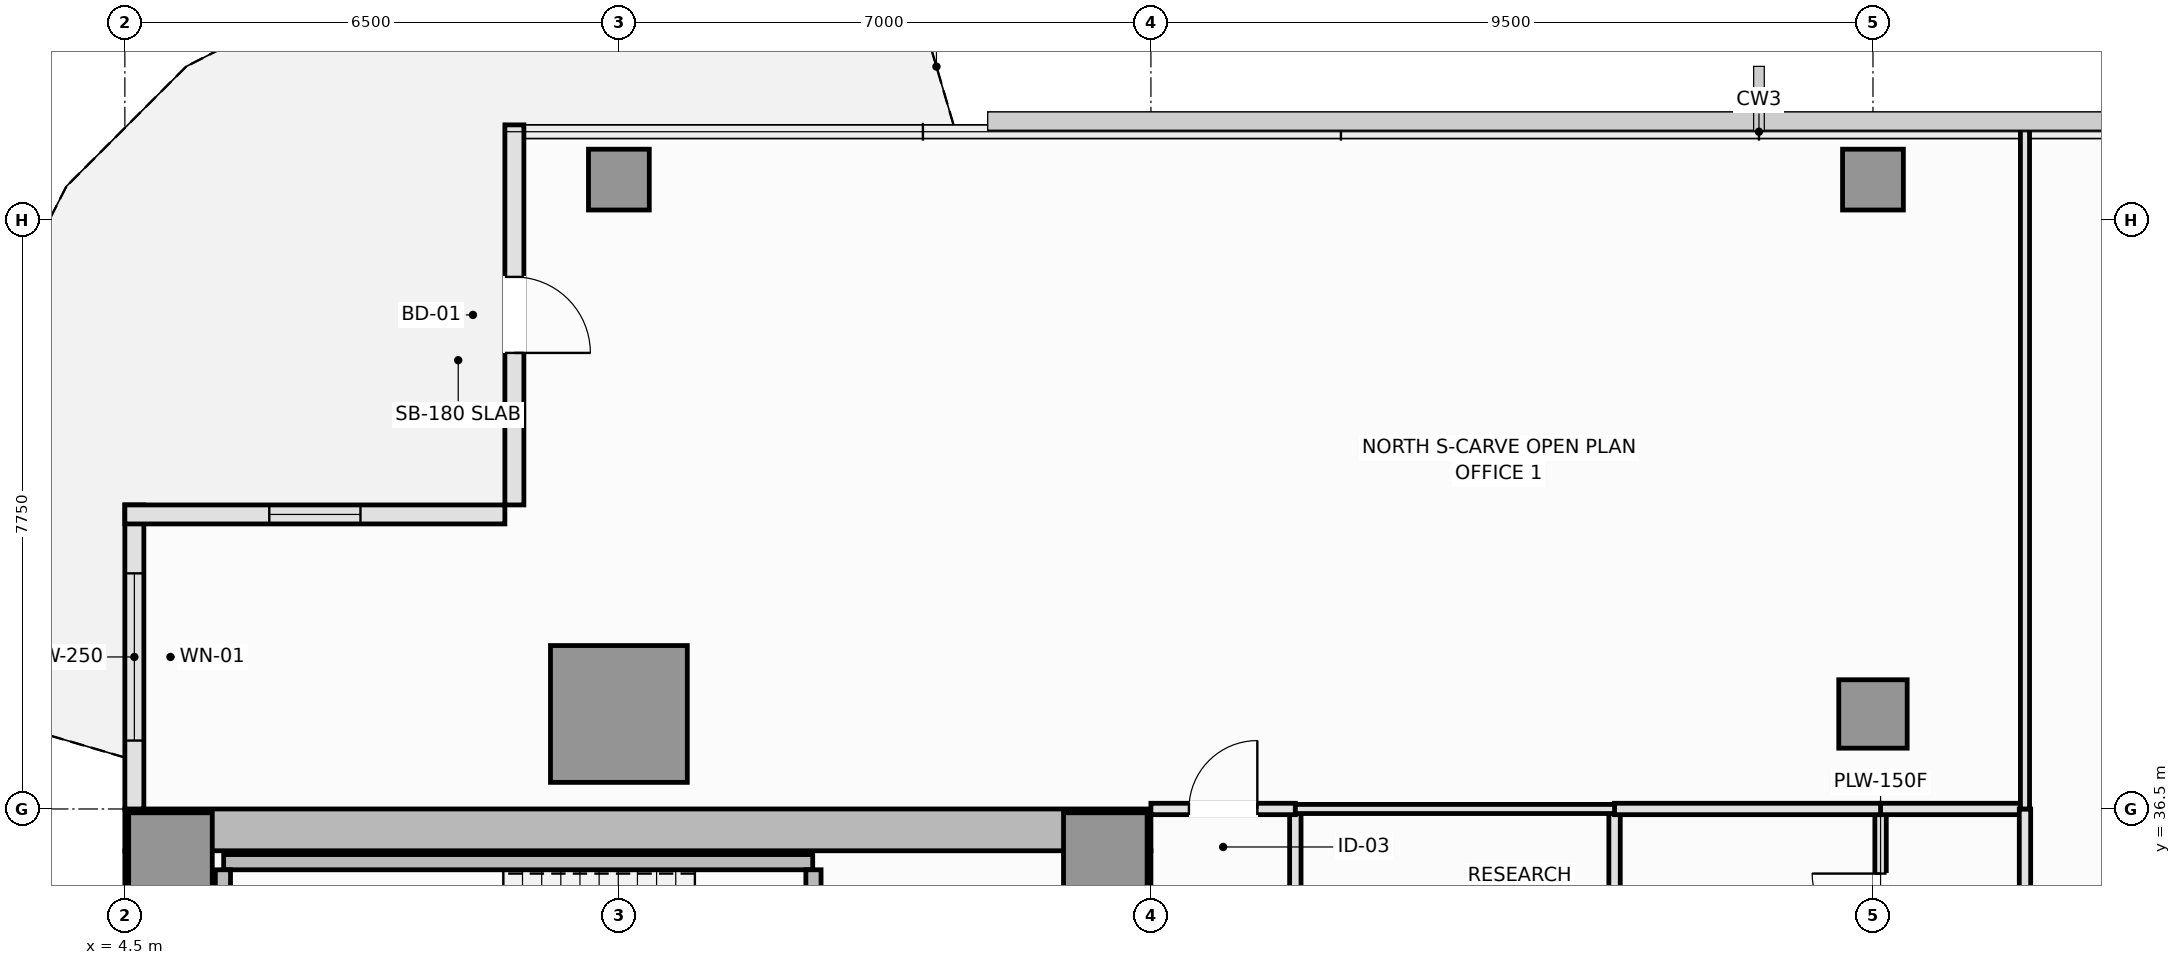
"""IFC4 building model, lengths in metres.
Left out: names, types, materials, properties, quantities, classifications, styles, units other than length and angle.
Written with IfcOpenShell. Run it as: python <this file> out.ifc"""

import sys

from ifc_helpers import new_model, si_unit, direction, frame, frame_2d, origin, origin_2d, place, context, subcontext, project, spatial, rectangle, extrude, element, fill, save


model = new_model("IFC4")
c1 = context("Model", 3, precision=1e-05, world=origin(), true_north=direction((0.0, 1.0)))
c2 = subcontext(c1, "Body", "Model", "MODEL_VIEW")
j1 = project(units=[si_unit("LENGTHUNIT", "METRE"), si_unit("PLANEANGLEUNIT", "RADIAN")], contexts=[c1])
p1 = place(None, origin())
s1 = spatial("IfcSite", under=j1, at=p1, CompositionType="ELEMENT")
p2 = place(p1, origin())
s2 = spatial("IfcBuilding", under=s1, at=p2, CompositionType="ELEMENT")
p3 = place(p2, frame((0.0, 0.0, 191.6)))
s3 = spatial("IfcBuildingStorey", under=s2, at=p3, CompositionType="ELEMENT", Elevation=191.6)
p4 = place(p3, frame((4.5, 36.225, 0.0), z_axis=(0.0, 0.0, 1.0), x_axis=(1.0, 0.0, 0.0)))
e1 = element("IfcWall", 1, at=p4, inside=s3, PredefinedType="SHEAR", context=c2, shape_type="SweptSolid", body=[
    extrude(rectangle(XDim=13.5, YDim=0.55, at=frame_2d((6.75, 0.0))), origin(), (0.0, 0.0, 1.0), 3.55),
])
p5 = place(p3, frame((4.775, 14.55, 0.0), z_axis=(0.0, 0.0, 1.0), x_axis=(0.0, 1.0, 0.0)))
e2 = element("IfcWall", 2, at=p5, inside=s3, PredefinedType="SHEAR", context=c2, shape_type="SweptSolid", body=[
    extrude(rectangle(XDim=21.4, YDim=0.55, at=frame_2d((10.7, 0.0))), origin(), (0.0, 0.0, 1.0), 3.55),
])
p6 = place(p3, frame((17.725, 27.05, 0.0), z_axis=(0.0, 0.0, 1.0), x_axis=(0.0, 1.0, 0.0)))
e3 = element("IfcWall", 3, at=p6, inside=s3, PredefinedType="SHEAR", context=c2, shape_type="SweptSolid", body=[
    extrude(rectangle(XDim=8.9, YDim=0.55, at=frame_2d((4.45, 0.0))), origin(), (0.0, 0.0, 1.0), 3.55),
])
p7 = place(p6, frame((3.45, 0.0, 0.0)))
e4 = element("IfcOpeningElement", 4, at=p7, cuts=e3, PredefinedType="OPENING", context=c2, shape_type="SweptSolid", body=[
    extrude(rectangle(XDim=1.1, YDim=2.15, at=frame_2d((0.55, 1.075))), frame((0.0, 0.285, 0.0), z_axis=(0.0, -1.0, 0.0), x_axis=(1.0, 0.0, 0.0)), (0.0, 0.0, 1.0), 0.57),
])
for number, where, z_axis, x_axis in (
    (5, (5.1, 35.9, 0.0), (0.0, 0.0, 1.0), (1.0, 0.0, 0.0)),
    (6, (17.4, 35.9, 0.0), (0.0, 0.0, 1.0), (1.0, 0.0, 0.0)),
):
    element("IfcColumn", number, at=place(p3, frame(where, z_axis=z_axis, x_axis=x_axis)), inside=s3, PredefinedType="PILASTER", context=c2, shape_type="SweptSolid", body=[
        extrude(rectangle(XDim=1.1, YDim=1.1, at=origin_2d()), origin(), (0.0, 0.0, 1.0), 3.55),
    ])
p8 = place(p3, frame((11.0, 37.75, 0.0), z_axis=(0.0, 0.0, 1.0), x_axis=(1.0, 0.0, 0.0)))
e7 = element("IfcColumn", 7, at=p8, inside=s3, PredefinedType="COLUMN", context=c2, shape_type="SweptSolid", body=[
    extrude(rectangle(XDim=1.8, YDim=1.8, at=origin_2d()), origin(), (0.0, 0.0, 1.0), 3.55),
])
p9 = place(p3, frame((27.5, 37.75, 0.0), z_axis=(0.0, 0.0, 1.0), x_axis=(1.0, 0.0, 0.0)))
e8 = element("IfcColumn", 8, at=p9, inside=s3, PredefinedType="COLUMN", context=c2, shape_type="SweptSolid", body=[
    extrude(rectangle(XDim=0.9, YDim=0.9, at=origin_2d()), origin(), (0.0, 0.0, 1.0), 3.55),
])
for number, where, z_axis, x_axis in (
    (9, (11.0, 44.78, 0.0), (0.0, 0.0, 1.0), (1.0, 0.0, 0.0)),
    (10, (27.5, 44.78, 0.0), (0.0, 0.0, 1.0), (1.0, 0.0, 0.0)),
):
    element("IfcColumn", number, at=place(p3, frame(where, z_axis=z_axis, x_axis=x_axis)), inside=s3, PredefinedType="COLUMN", context=c2, shape_type="SweptSolid", body=[
        extrude(rectangle(XDim=0.8, YDim=0.8, at=origin_2d()), origin(), (0.0, 0.0, 1.0), 3.55),
    ])
p10 = place(p3, frame((4.625, 40.5, 0.0), z_axis=(0.0, 0.0, 1.0), x_axis=(0.0, -1.0, 0.0)))
e11 = element("IfcWall", 11, at=p10, inside=s3, PredefinedType="SOLIDWALL", context=c2, shape_type="SweptSolid", body=[
    extrude(rectangle(XDim=4.0, YDim=0.25, at=frame_2d((2.0, 0.0))), origin(), (0.0, 0.0, 1.0), 3.37),
])
p11 = place(p10, frame((0.9, 0.0, 0.9)))
e12 = element("IfcOpeningElement", 12, at=p11, cuts=e11, PredefinedType="OPENING", context=c2, shape_type="SweptSolid", body=[
    extrude(rectangle(XDim=2.2, YDim=1.8, at=frame_2d((1.1, 0.9))), frame((0.0, 0.135, 0.0), z_axis=(0.0, -1.0, 0.0), x_axis=(1.0, 0.0, 0.0)), (0.0, 0.0, 1.0), 0.27),
])
p12 = place(p3, frame((9.625, 45.5, 0.0), z_axis=(0.0, 0.0, 1.0), x_axis=(0.0, -1.0, 0.0)))
e13 = element("IfcWall", 13, at=p12, inside=s3, PredefinedType="SOLIDWALL", context=c2, shape_type="SweptSolid", body=[
    extrude(rectangle(XDim=5.0, YDim=0.25, at=frame_2d((2.5, 0.0))), origin(), (0.0, 0.0, 1.0), 3.1),
])
p13 = place(p12, frame((2.0, 0.0, 0.0)))
e14 = element("IfcOpeningElement", 14, at=p13, cuts=e13, PredefinedType="OPENING", context=c2, shape_type="SweptSolid", body=[
    extrude(rectangle(XDim=1.0, YDim=2.2, at=frame_2d((0.5, 1.1))), frame((0.0, 0.135, 0.0), z_axis=(0.0, -1.0, 0.0), x_axis=(1.0, 0.0, 0.0)), (0.0, 0.0, 1.0), 0.27),
])
p14 = place(p3, frame((9.5, 40.375, 0.0), z_axis=(0.0, 0.0, 1.0), x_axis=(-1.0, 0.0, 0.0)))
e15 = element("IfcWall", 15, at=p14, inside=s3, PredefinedType="SOLIDWALL", context=c2, shape_type="SweptSolid", body=[
    extrude(rectangle(XDim=5.0, YDim=0.25, at=frame_2d((2.5, 0.0))), origin(), (0.0, 0.0, 1.0), 3.37),
])
p15 = place(p14, frame((1.9, 0.0, 0.9)))
e16 = element("IfcOpeningElement", 16, at=p15, cuts=e15, PredefinedType="OPENING", context=c2, shape_type="SweptSolid", body=[
    extrude(rectangle(XDim=1.2, YDim=1.8, at=frame_2d((0.6, 0.9))), frame((0.0, 0.135, 0.0), z_axis=(0.0, -1.0, 0.0), x_axis=(1.0, 0.0, 0.0)), (0.0, 0.0, 1.0), 0.27),
])
p16 = place(p3, frame((5.8, 35.8, 0.0), z_axis=(0.0, 0.0, 1.0), x_axis=(1.0, 0.0, 0.0)))
e17 = element("IfcWall", 17, at=p16, inside=s3, PredefinedType="SOLIDWALL", context=c2, shape_type="SweptSolid", body=[
    extrude(rectangle(XDim=7.75, YDim=0.2, at=frame_2d((3.875, 0.0))), origin(), (0.0, 0.0, 1.0), 3.55),
])
p17 = place(p3, frame((5.79, 32.65, 0.0), z_axis=(0.0, 0.0, 1.0), x_axis=(0.0, 1.0, 0.0)))
e18 = element("IfcWall", 18, at=p17, inside=s3, PredefinedType="SOLIDWALL", context=c2, shape_type="SweptSolid", body=[
    extrude(rectangle(XDim=3.05, YDim=0.2, at=frame_2d((1.525, 0.0))), origin(), (0.0, 0.0, 1.0), 3.55),
])
p18 = place(p3, frame((13.56, 32.65, 0.0), z_axis=(0.0, 0.0, 1.0), x_axis=(0.0, 1.0, 0.0)))
e19 = element("IfcWall", 19, at=p18, inside=s3, PredefinedType="SOLIDWALL", context=c2, shape_type="SweptSolid", body=[
    extrude(rectangle(XDim=3.05, YDim=0.2, at=frame_2d((1.525, 0.0))), origin(), (0.0, 0.0, 1.0), 3.55),
])
p19 = place(p18, frame((0.95, 0.0, 0.0)))
e20 = element("IfcOpeningElement", 20, at=p19, cuts=e19, PredefinedType="OPENING", context=c2, shape_type="SweptSolid", body=[
    extrude(rectangle(XDim=1.15, YDim=2.15, at=frame_2d((0.575, 1.075))), frame((0.0, 0.11, 0.0), z_axis=(0.0, -1.0, 0.0), x_axis=(1.0, 0.0, 0.0)), (0.0, 0.0, 1.0), 0.22),
])
p20 = place(p3, frame((19.9, 32.6, 0.0), z_axis=(0.0, 0.0, 1.0), x_axis=(0.0, 1.0, 0.0)))
e21 = element("IfcWall", 21, at=p20, inside=s3, PredefinedType="PARTITIONING", context=c2, shape_type="SweptSolid", body=[
    extrude(rectangle(XDim=3.9, YDim=0.15, at=frame_2d((1.95, 0.0))), origin(), (0.0, 0.0, 1.0), 3.37),
])
p21 = place(p20, frame((1.45, 0.0, 0.0)))
e22 = element("IfcOpeningElement", 22, at=p21, cuts=e21, PredefinedType="OPENING", context=c2, shape_type="SweptSolid", body=[
    extrude(rectangle(XDim=1.0, YDim=2.15, at=frame_2d((0.5, 1.075))), frame((0.0, 0.085, 0.0), z_axis=(0.0, -1.0, 0.0), x_axis=(1.0, 0.0, 0.0)), (0.0, 0.0, 1.0), 0.17),
])
p22 = place(p3, frame((18.0, 36.5, 0.0), z_axis=(0.0, 0.0, 1.0), x_axis=(1.0, 0.0, 0.0)))
e23 = element("IfcWall", 23, at=p22, inside=s3, PredefinedType="PARTITIONING", context=c2, shape_type="SweptSolid", body=[
    extrude(rectangle(XDim=1.9, YDim=0.15, at=frame_2d((0.95, 0.0))), origin(), (0.0, 0.0, 1.0), 3.37),
])
p23 = place(p22, frame((0.5, 0.0, 0.0)))
e24 = element("IfcOpeningElement", 24, at=p23, cuts=e23, PredefinedType="OPENING", context=c2, shape_type="SweptSolid", body=[
    extrude(rectangle(XDim=0.9, YDim=2.1, at=frame_2d((0.45, 1.05))), frame((0.0, 0.085, 0.0), z_axis=(0.0, -1.0, 0.0), x_axis=(1.0, 0.0, 0.0)), (0.0, 0.0, 1.0), 0.17),
])
p24 = place(p3, frame((27.6, 33.9, 0.0), z_axis=(0.0, 0.0, 1.0), x_axis=(0.0, 1.0, 0.0)))
e25 = element("IfcWall", 25, at=p24, inside=s3, PredefinedType="PLUMBINGWALL", context=c2, shape_type="SweptSolid", body=[
    extrude(rectangle(XDim=2.6, YDim=0.15, at=frame_2d((1.3, 0.0))), origin(), (0.0, 0.0, 1.0), 3.37),
])
p25 = place(p24, frame((0.85, 0.0, 0.0)))
e26 = element("IfcOpeningElement", 26, at=p25, cuts=e25, PredefinedType="OPENING", context=c2, shape_type="SweptSolid", body=[
    extrude(rectangle(XDim=0.9, YDim=2.1, at=frame_2d((0.45, 1.05))), frame((0.0, 0.085, 0.0), z_axis=(0.0, -1.0, 0.0), x_axis=(1.0, 0.0, 0.0)), (0.0, 0.0, 1.0), 0.17),
])
p26 = place(p3, frame((27.6, 36.5, 0.0), z_axis=(0.0, 0.0, 1.0), x_axis=(1.0, 0.0, 0.0)))
e27 = element("IfcWall", 27, at=p26, inside=s3, PredefinedType="PARTITIONING", context=c2, shape_type="SweptSolid", body=[
    extrude(rectangle(XDim=1.9, YDim=0.15, at=frame_2d((0.95, 0.0))), origin(), (0.0, 0.0, 1.0), 3.37),
])
p27 = place(p3, frame((29.5, 14.0, 0.0), z_axis=(0.0, 0.0, 1.0), x_axis=(0.0, 1.0, 0.0)))
e28 = element("IfcWall", 28, at=p27, inside=s3, PredefinedType="PARTITIONING", context=c2, shape_type="SweptSolid", body=[
    extrude(rectangle(XDim=22.5, YDim=0.15, at=frame_2d((11.25, 0.0))), origin(), (0.0, 0.0, 1.0), 3.37),
])
p28 = place(p27, frame((10.75, 0.0, 0.0)))
e29 = element("IfcOpeningElement", 29, at=p28, cuts=e28, PredefinedType="OPENING", context=c2, shape_type="SweptSolid", body=[
    extrude(rectangle(XDim=1.0, YDim=2.15, at=frame_2d((0.5, 1.075))), frame((0.0, 0.085, 0.0), z_axis=(0.0, -1.0, 0.0), x_axis=(1.0, 0.0, 0.0)), (0.0, 0.0, 1.0), 0.17),
])
p29 = place(p3, frame((24.1, 33.9, 0.0), z_axis=(0.0, 0.0, 1.0), x_axis=(0.0, 1.0, 0.0)))
e30 = element("IfcWall", 30, at=p29, inside=s3, PredefinedType="PLUMBINGWALL", context=c2, shape_type="SweptSolid", body=[
    extrude(rectangle(XDim=2.6, YDim=0.15, at=frame_2d((1.3, 0.0))), origin(), (0.0, 0.0, 1.0), 3.07),
])
p30 = place(p3, frame((24.1, 36.5, 0.0), z_axis=(0.0, 0.0, 1.0), x_axis=(1.0, 0.0, 0.0)))
e31 = element("IfcWall", 31, at=p30, inside=s3, PredefinedType="PLUMBINGWALL", context=c2, shape_type="SweptSolid", body=[
    extrude(rectangle(XDim=3.5, YDim=0.15, at=frame_2d((1.75, 0.0))), origin(), (0.0, 0.0, 1.0), 3.37),
])
p31 = place(p3, frame((19.9, 36.5, 0.0), z_axis=(0.0, 0.0, 1.0), x_axis=(1.0, 0.0, 0.0)))
e32 = element("IfcWall", 32, at=p31, inside=s3, PredefinedType="PARTITIONING", context=c2, shape_type="SweptSolid", body=[
    extrude(rectangle(XDim=4.2, YDim=0.12, at=frame_2d((2.1, 0.0))), origin(), (0.0, 0.0, 1.0), 3.37),
])
p32 = place(p3, frame((29.5, 36.5, 0.0), z_axis=(0.0, 0.0, 1.0), x_axis=(0.0, 1.0, 0.0)))
e33 = element("IfcWall", 33, at=p32, inside=s3, PredefinedType="PARTITIONING", context=c2, shape_type="SweptSolid", body=[
    extrude(rectangle(XDim=8.99, YDim=0.12, at=frame_2d((4.495, 0.0))), origin(), (0.0, 0.0, 1.0), 3.37),
])
p33 = place(p11, origin())
e34 = element("IfcWindow", 34, at=p33, inside=s3, PartitioningType="SINGLE_PANEL", PredefinedType="WINDOW", context=c2, shape_type="SweptSolid", body=[
    extrude(rectangle(XDim=2.2, YDim=1.8, at=frame_2d((1.1, 0.9))), frame((0.0, 0.03, 0.0), z_axis=(0.0, -1.0, 0.0), x_axis=(1.0, 0.0, 0.0)), (0.0, 0.0, 1.0), 0.06),
])
fill(e12, e34)
p34 = place(p13, frame((1.0, 0.0, 0.0), z_axis=(0.0, 0.0, 1.0), x_axis=(-1.0, 0.0, 0.0)))
e35 = element("IfcDoor", 35, at=p34, inside=s3, OperationType="SINGLE_SWING_RIGHT", PredefinedType="DOOR", context=c2, shape_type="SweptSolid", body=[
    extrude(rectangle(XDim=1.0, YDim=2.2, at=frame_2d((0.5, 1.1))), frame((0.0, 0.025, 0.0), z_axis=(0.0, -1.0, 0.0), x_axis=(1.0, 0.0, 0.0)), (0.0, 0.0, 1.0), 0.05),
])
fill(e14, e35)
p35 = place(p15, origin())
e36 = element("IfcWindow", 36, at=p35, inside=s3, PartitioningType="SINGLE_PANEL", PredefinedType="WINDOW", context=c2, shape_type="SweptSolid", body=[
    extrude(rectangle(XDim=1.2, YDim=1.8, at=frame_2d((0.6, 0.9))), frame((0.0, 0.03, 0.0), z_axis=(0.0, -1.0, 0.0), x_axis=(1.0, 0.0, 0.0)), (0.0, 0.0, 1.0), 0.06),
])
fill(e16, e36)
p36 = place(p23, origin())
e37 = element("IfcDoor", 37, at=p36, inside=s3, OperationType="SINGLE_SWING_RIGHT", PredefinedType="DOOR", context=c2, shape_type="SweptSolid", body=[
    extrude(rectangle(XDim=0.9, YDim=2.1, at=frame_2d((0.45, 1.05))), frame((0.0, 0.025, 0.0), z_axis=(0.0, -1.0, 0.0), x_axis=(1.0, 0.0, 0.0)), (0.0, 0.0, 1.0), 0.05),
])
fill(e24, e37)
p37 = place(p25, origin())
e38 = element("IfcDoor", 38, at=p37, inside=s3, OperationType="SINGLE_SWING_RIGHT", PredefinedType="DOOR", context=c2, shape_type="SweptSolid", body=[
    extrude(rectangle(XDim=0.9, YDim=2.1, at=frame_2d((0.45, 1.05))), frame((0.0, 0.025, 0.0), z_axis=(0.0, -1.0, 0.0), x_axis=(1.0, 0.0, 0.0)), (0.0, 0.0, 1.0), 0.05),
])
fill(e26, e38)
save(model, sys.argv[1])
